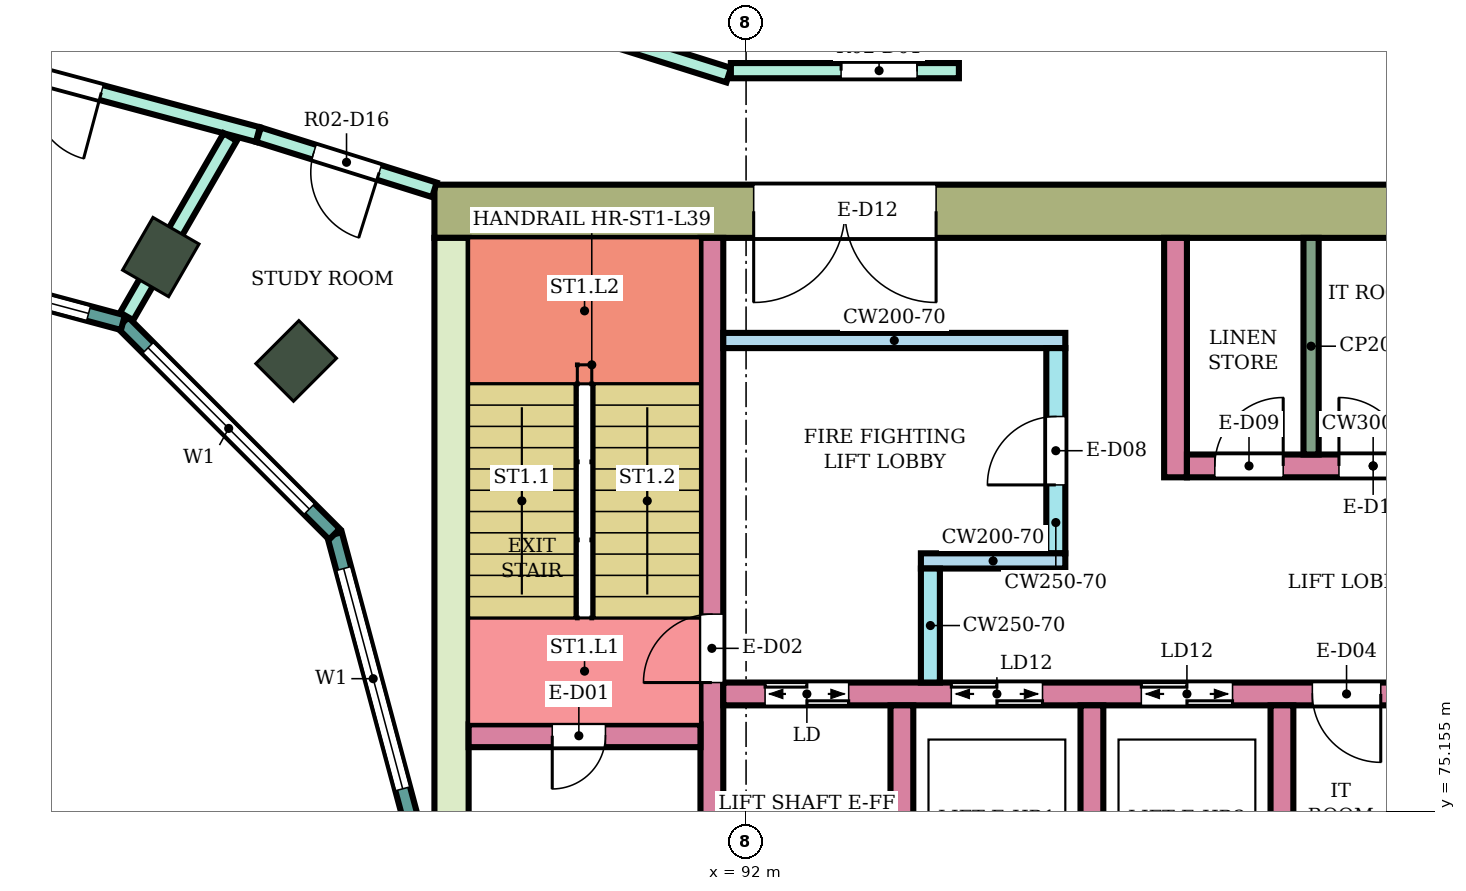
"""IFC4 building model, lengths in metres.
Left out: names, types, materials, properties, quantities, classifications, styles, units other than length and angle.
Written with IfcOpenShell. Run it as: python <this file> out.ifc"""

import sys

from ifc_helpers import new_model, si_unit, direction, frame, frame_2d, origin, origin_2d, place, context, subcontext, project, spatial, rectangle, extrude, element, fill, save


model = new_model("IFC4")
c1 = context("Model", 3, precision=1e-05, world=origin(), true_north=direction((0.0, 1.0)))
c2 = subcontext(c1, "Body", "Model", "MODEL_VIEW")
j1 = project(units=[si_unit("LENGTHUNIT", "METRE"), si_unit("PLANEANGLEUNIT", "RADIAN")], contexts=[c1])
p1 = place(None, origin())
s1 = spatial("IfcSite", under=j1, at=p1, CompositionType="ELEMENT")
p2 = place(p1, origin())
s2 = spatial("IfcBuilding", under=s1, at=p2, CompositionType="ELEMENT")
p3 = place(p2, frame((0.0, 0.0, 170.0)))
s3 = spatial("IfcBuildingStorey", under=s2, at=p3, CompositionType="ELEMENT", Elevation=170.0)
for number, where, z_axis, x_axis in (
    (1, (86.081, 81.081, 0.0), (0.0, 0.0, 1.0), (0.707, 0.707, 0.0)),
    (2, (84.3, 82.448, 0.0), (0.0, 0.0, 1.0), (0.5, 0.866, 0.0)),
):
    element("IfcColumn", number, at=place(p3, frame(where, z_axis=z_axis, x_axis=x_axis)), inside=s3, PredefinedType="COLUMN", context=c2, shape_type="SweptSolid", body=[
        extrude(rectangle(XDim=0.8, YDim=0.7, at=origin_2d()), origin(), (0.0, 0.0, 1.0), 4.1),
    ])
p4 = place(p3, frame((87.9, 83.05, 0.0), z_axis=(0.0, 0.0, 1.0), x_axis=(1.0, 0.0, 0.0)))
e3 = element("IfcWall", 3, at=p4, inside=s3, PredefinedType="SHEAR", context=c2, shape_type="SweptSolid", body=[
    extrude(rectangle(XDim=14.8, YDim=0.7, at=frame_2d((7.4, 0.0))), origin(), (0.0, 0.0, 1.0), 3.78),
])
p5 = place(p4, frame((4.2, 0.0, 0.0)))
e4 = element("IfcOpeningElement", 4, at=p5, cuts=e3, PredefinedType="OPENING", context=c2, shape_type="SweptSolid", body=[
    extrude(rectangle(XDim=2.4, YDim=2.4, at=frame_2d((1.2, 1.2))), frame((0.0, 0.36, 0.0), z_axis=(0.0, -1.0, 0.0), x_axis=(1.0, 0.0, 0.0)), (0.0, 0.0, 1.0), 0.72),
])
p6 = place(p3, frame((88.125, 75.0, 0.0), z_axis=(0.0, 0.0, 1.0), x_axis=(0.0, 1.0, 0.0)))
e5 = element("IfcWall", 5, at=p6, inside=s3, PredefinedType="SHEAR", context=c2, shape_type="SweptSolid", body=[
    extrude(rectangle(XDim=7.7, YDim=0.45, at=frame_2d((3.85, 0.0))), origin(), (0.0, 0.0, 1.0), 3.78),
])
p7 = place(p3, frame((91.55, 75.0, 0.0), z_axis=(0.0, 0.0, 1.0), x_axis=(0.0, 1.0, 0.0)))
e6 = element("IfcWall", 6, at=p7, inside=s3, PredefinedType="SHEAR", context=c2, shape_type="SweptSolid", body=[
    extrude(rectangle(XDim=7.7, YDim=0.3, at=frame_2d((3.85, 0.0))), origin(), (0.0, 0.0, 1.0), 3.78),
])
p8 = place(p7, frame((1.85, 0.0, 0.0)))
e7 = element("IfcOpeningElement", 7, at=p8, cuts=e6, PredefinedType="OPENING", context=c2, shape_type="SweptSolid", body=[
    extrude(rectangle(XDim=0.9, YDim=2.1, at=frame_2d((0.45, 1.05))), frame((0.0, 0.16, 0.0), z_axis=(0.0, -1.0, 0.0), x_axis=(1.0, 0.0, 0.0)), (0.0, 0.0, 1.0), 0.32),
])
p9 = place(p3, frame((88.35, 76.15, 0.0), z_axis=(0.0, 0.0, 1.0), x_axis=(1.0, 0.0, 0.0)))
e8 = element("IfcWall", 8, at=p9, inside=s3, PredefinedType="SHEAR", context=c2, shape_type="SweptSolid", body=[
    extrude(rectangle(XDim=3.05, YDim=0.3, at=frame_2d((1.525, 0.0))), origin(), (0.0, 0.0, 1.0), 3.78),
])
p10 = place(p9, frame((1.1, 0.0, 0.0)))
e9 = element("IfcOpeningElement", 9, at=p10, cuts=e8, PredefinedType="OPENING", context=c2, shape_type="SweptSolid", body=[
    extrude(rectangle(XDim=0.7, YDim=2.0, at=frame_2d((0.35, 1.0))), frame((0.0, 0.16, 0.0), z_axis=(0.0, -1.0, 0.0), x_axis=(1.0, 0.0, 0.0)), (0.0, 0.0, 1.0), 0.32),
])
p11 = place(p3, frame((91.7, 76.7, 0.0), z_axis=(0.0, 0.0, 1.0), x_axis=(1.0, 0.0, 0.0)))
e10 = element("IfcWall", 10, at=p11, inside=s3, PredefinedType="SHEAR", context=c2, shape_type="SweptSolid", body=[
    extrude(rectangle(XDim=11.0, YDim=0.3, at=frame_2d((5.5, 0.0))), origin(), (0.0, 0.0, 1.0), 3.78),
])
p12 = place(p11, frame((0.55, 0.0, 0.0)))
e11 = element("IfcOpeningElement", 11, at=p12, cuts=e10, PredefinedType="OPENING", context=c2, shape_type="SweptSolid", body=[
    extrude(rectangle(XDim=1.1, YDim=2.1, at=frame_2d((0.55, 1.05))), frame((0.0, 0.16, 0.0), z_axis=(0.0, -1.0, 0.0), x_axis=(1.0, 0.0, 0.0)), (0.0, 0.0, 1.0), 0.32),
])
p13 = place(p11, frame((3.0, 0.0, 0.0)))
e12 = element("IfcOpeningElement", 12, at=p13, cuts=e10, PredefinedType="OPENING", context=c2, shape_type="SweptSolid", body=[
    extrude(rectangle(XDim=1.2, YDim=2.1, at=frame_2d((0.6, 1.05))), frame((0.0, 0.16, 0.0), z_axis=(0.0, -1.0, 0.0), x_axis=(1.0, 0.0, 0.0)), (0.0, 0.0, 1.0), 0.32),
])
p14 = place(p11, frame((5.5, 0.0, 0.0)))
e13 = element("IfcOpeningElement", 13, at=p14, cuts=e10, PredefinedType="OPENING", context=c2, shape_type="SweptSolid", body=[
    extrude(rectangle(XDim=1.2, YDim=2.1, at=frame_2d((0.6, 1.05))), frame((0.0, 0.16, 0.0), z_axis=(0.0, -1.0, 0.0), x_axis=(1.0, 0.0, 0.0)), (0.0, 0.0, 1.0), 0.32),
])
p15 = place(p11, frame((7.75, 0.0, 0.0)))
e14 = element("IfcOpeningElement", 14, at=p15, cuts=e10, PredefinedType="OPENING", context=c2, shape_type="SweptSolid", body=[
    extrude(rectangle(XDim=0.9, YDim=2.1, at=frame_2d((0.45, 1.05))), frame((0.0, 0.16, 0.0), z_axis=(0.0, -1.0, 0.0), x_axis=(1.0, 0.0, 0.0)), (0.0, 0.0, 1.0), 0.32),
])
p16 = place(p11, frame((9.5, 0.0, 0.0)))
e15 = element("IfcOpeningElement", 15, at=p16, cuts=e10, PredefinedType="OPENING", context=c2, shape_type="SweptSolid", body=[
    extrude(rectangle(XDim=0.9, YDim=2.1, at=frame_2d((0.45, 1.05))), frame((0.0, 0.16, 0.0), z_axis=(0.0, -1.0, 0.0), x_axis=(1.0, 0.0, 0.0)), (0.0, 0.0, 1.0), 0.32),
])
for number, where, z_axis, x_axis in (
    (16, (94.05, 74.0, 0.0), (0.0, 0.0, 1.0), (0.0, 1.0, 0.0)),
    (17, (96.55, 74.0, 0.0), (0.0, 0.0, 1.0), (0.0, 1.0, 0.0)),
    (18, (99.05, 74.0, 0.0), (0.0, 0.0, 1.0), (0.0, 1.0, 0.0)),
):
    element("IfcWall", number, at=place(p3, frame(where, z_axis=z_axis, x_axis=x_axis)), inside=s3, PredefinedType="SHEAR", context=c2, shape_type="SweptSolid", body=[
        extrude(rectangle(XDim=2.55, YDim=0.3, at=frame_2d((1.275, 0.0))), origin(), (0.0, 0.0, 1.0), 3.78),
    ])
p17 = place(p3, frame((91.7, 81.35, 0.0), z_axis=(0.0, 0.0, 1.0), x_axis=(1.0, 0.0, 0.0)))
e19 = element("IfcWall", 19, at=p17, inside=s3, PredefinedType="SHEAR", context=c2, shape_type="SweptSolid", body=[
    extrude(rectangle(XDim=4.5, YDim=0.2, at=frame_2d((2.25, 0.0))), origin(), (0.0, 0.0, 1.0), 3.78),
])
p18 = place(p3, frame((96.075, 78.55, 0.0), z_axis=(0.0, 0.0, 1.0), x_axis=(0.0, 1.0, 0.0)))
e20 = element("IfcWall", 20, at=p18, inside=s3, PredefinedType="SHEAR", context=c2, shape_type="SweptSolid", body=[
    extrude(rectangle(XDim=2.7, YDim=0.25, at=frame_2d((1.35, 0.0))), origin(), (0.0, 0.0, 1.0), 3.78),
])
p19 = place(p18, frame((0.9, 0.0, 0.0)))
e21 = element("IfcOpeningElement", 21, at=p19, cuts=e20, PredefinedType="OPENING", context=c2, shape_type="SweptSolid", body=[
    extrude(rectangle(XDim=0.9, YDim=2.1, at=frame_2d((0.45, 1.05))), frame((0.0, 0.135, 0.0), z_axis=(0.0, -1.0, 0.0), x_axis=(1.0, 0.0, 0.0)), (0.0, 0.0, 1.0), 0.27),
])
p20 = place(p3, frame((94.3, 78.45, 0.0), z_axis=(0.0, 0.0, 1.0), x_axis=(1.0, 0.0, 0.0)))
e22 = element("IfcWall", 22, at=p20, inside=s3, PredefinedType="SHEAR", context=c2, shape_type="SweptSolid", body=[
    extrude(rectangle(XDim=1.9, YDim=0.2, at=frame_2d((0.95, 0.0))), origin(), (0.0, 0.0, 1.0), 3.78),
])
p21 = place(p3, frame((94.425, 76.85, 0.0), z_axis=(0.0, 0.0, 1.0), x_axis=(0.0, 1.0, 0.0)))
e23 = element("IfcWall", 23, at=p21, inside=s3, PredefinedType="SHEAR", context=c2, shape_type="SweptSolid", body=[
    extrude(rectangle(XDim=1.5, YDim=0.25, at=frame_2d((0.75, 0.0))), origin(), (0.0, 0.0, 1.0), 3.78),
])
p22 = place(p3, frame((97.65, 79.55, 0.0), z_axis=(0.0, 0.0, 1.0), x_axis=(0.0, 1.0, 0.0)))
e24 = element("IfcWall", 24, at=p22, inside=s3, PredefinedType="SHEAR", context=c2, shape_type="SweptSolid", body=[
    extrude(rectangle(XDim=3.15, YDim=0.3, at=frame_2d((1.575, 0.0))), origin(), (0.0, 0.0, 1.0), 3.78),
])
p23 = place(p3, frame((97.8, 79.7, 0.0), z_axis=(0.0, 0.0, 1.0), x_axis=(1.0, 0.0, 0.0)))
e25 = element("IfcWall", 25, at=p23, inside=s3, PredefinedType="SHEAR", context=c2, shape_type="SweptSolid", body=[
    extrude(rectangle(XDim=4.9, YDim=0.3, at=frame_2d((2.45, 0.0))), origin(), (0.0, 0.0, 1.0), 3.78),
])
p24 = place(p23, frame((0.367, 0.0, 0.0)))
e26 = element("IfcOpeningElement", 26, at=p24, cuts=e25, PredefinedType="OPENING", context=c2, shape_type="SweptSolid", body=[
    extrude(rectangle(XDim=0.9, YDim=2.1, at=frame_2d((0.45, 1.05))), frame((0.0, 0.16, 0.0), z_axis=(0.0, -1.0, 0.0), x_axis=(1.0, 0.0, 0.0)), (0.0, 0.0, 1.0), 0.32),
])
p25 = place(p23, frame((2.0, 0.0, 0.0)))
e27 = element("IfcOpeningElement", 27, at=p25, cuts=e25, PredefinedType="OPENING", context=c2, shape_type="SweptSolid", body=[
    extrude(rectangle(XDim=0.9, YDim=2.1, at=frame_2d((0.45, 1.05))), frame((0.0, 0.16, 0.0), z_axis=(0.0, -1.0, 0.0), x_axis=(1.0, 0.0, 0.0)), (0.0, 0.0, 1.0), 0.32),
])
p26 = place(p23, frame((3.633, 0.0, 0.0)))
e28 = element("IfcOpeningElement", 28, at=p26, cuts=e25, PredefinedType="OPENING", context=c2, shape_type="SweptSolid", body=[
    extrude(rectangle(XDim=0.9, YDim=2.1, at=frame_2d((0.45, 1.05))), frame((0.0, 0.16, 0.0), z_axis=(0.0, -1.0, 0.0), x_axis=(1.0, 0.0, 0.0)), (0.0, 0.0, 1.0), 0.32),
])
p27 = place(p3, frame((87.604, 75.0, 0.0), z_axis=(0.0, 0.0, 1.0), x_axis=(-0.258789828301, 0.965933654434, 0.0)))
e29 = element("IfcWall", 29, at=p27, inside=s3, PredefinedType="NOTDEFINED", context=c2, shape_type="SweptSolid", body=[
    extrude(rectangle(XDim=3.936, YDim=0.2, at=frame_2d((1.968, 0.0))), origin(), (0.0, 0.0, 1.0), 4.1),
])
p28 = place(p27, frame((0.468, 0.0, 0.9)))
e30 = element("IfcOpeningElement", 30, at=p28, cuts=e29, PredefinedType="OPENING", context=c2, shape_type="SweptSolid", body=[
    extrude(rectangle(XDim=3.0, YDim=2.3, at=frame_2d((1.5, 1.15))), frame((0.0, 0.11, 0.0), z_axis=(0.0, -1.0, 0.0), x_axis=(1.0, 0.0, 0.0)), (0.0, 0.0, 1.0), 0.22),
])
p29 = place(p3, frame((86.585, 78.802, 0.0), z_axis=(0.0, 0.0, 1.0), x_axis=(-0.707106781187, 0.707106781187, 0.0)))
e31 = element("IfcWall", 31, at=p29, inside=s3, PredefinedType="NOTDEFINED", context=c2, shape_type="SweptSolid", body=[
    extrude(rectangle(XDim=3.936, YDim=0.2, at=frame_2d((1.968, 0.0))), origin(), (0.0, 0.0, 1.0), 4.1),
])
p30 = place(p29, frame((0.468, 0.0, 0.9)))
e32 = element("IfcOpeningElement", 32, at=p30, cuts=e31, PredefinedType="OPENING", context=c2, shape_type="SweptSolid", body=[
    extrude(rectangle(XDim=3.0, YDim=2.3, at=frame_2d((1.5, 1.15))), frame((0.0, 0.11, 0.0), z_axis=(0.0, -1.0, 0.0), x_axis=(1.0, 0.0, 0.0)), (0.0, 0.0, 1.0), 0.22),
])
p31 = place(p3, frame((83.802, 81.585, 0.0), z_axis=(0.0, 0.0, 1.0), x_axis=(-0.965933654434, 0.258789828301, 0.0)))
e33 = element("IfcWall", 33, at=p31, inside=s3, PredefinedType="NOTDEFINED", context=c2, shape_type="SweptSolid", body=[
    extrude(rectangle(XDim=3.936, YDim=0.2, at=frame_2d((1.968, 0.0))), origin(), (0.0, 0.0, 1.0), 4.1),
])
p32 = place(p31, frame((0.468, 0.0, 0.9)))
e34 = element("IfcOpeningElement", 34, at=p32, cuts=e33, PredefinedType="OPENING", context=c2, shape_type="SweptSolid", body=[
    extrude(rectangle(XDim=3.0, YDim=2.3, at=frame_2d((1.5, 1.15))), frame((0.0, 0.11, 0.0), z_axis=(0.0, -1.0, 0.0), x_axis=(1.0, 0.0, 0.0)), (0.0, 0.0, 1.0), 0.22),
])
p33 = place(p3, frame((80.0, 85.554, 0.0), z_axis=(0.0, 0.0, 1.0), x_axis=(0.965894438951, -0.258936155845, 0.0)))
e35 = element("IfcWall", 35, at=p33, inside=s3, PredefinedType="PARTITIONING", context=c2, shape_type="SweptSolid", body=[
    extrude(rectangle(XDim=5.774, YDim=0.2, at=frame_2d((2.887, 0.0))), origin(), (0.0, 0.0, 1.0), 3.65),
])
p34 = place(p33, frame((1.841, 0.0, 0.0)))
e36 = element("IfcOpeningElement", 36, at=p34, cuts=e35, PredefinedType="OPENING", context=c2, shape_type="SweptSolid", body=[
    extrude(rectangle(XDim=1.8, YDim=2.1, at=frame_2d((0.9, 1.05))), frame((0.0, 0.11, 0.0), z_axis=(0.0, -1.0, 0.0), x_axis=(1.0, 0.0, 0.0)), (0.0, 0.0, 1.0), 0.22),
])
p35 = place(p3, frame((83.851, 81.667, 0.0), z_axis=(0.0, 0.0, 1.0), x_axis=(0.500099931433, 0.865967700657, 0.0)))
e37 = element("IfcWall", 37, at=p35, inside=s3, PredefinedType="PARTITIONING", context=c2, shape_type="SweptSolid", body=[
    extrude(rectangle(XDim=2.725, YDim=0.2, at=frame_2d((1.362, 0.0))), origin(), (0.0, 0.0, 1.0), 3.65),
])
p36 = place(p3, frame((85.587, 84.057, 0.0), z_axis=(0.0, 0.0, 1.0), x_axis=(0.954239513179, -0.299043393987, 0.0)))
e38 = element("IfcWall", 38, at=p36, inside=s3, PredefinedType="PARTITIONING", context=c2, shape_type="SweptSolid", body=[
    extrude(rectangle(XDim=2.424, YDim=0.2, at=frame_2d((1.212, 0.0))), origin(), (0.0, 0.0, 1.0), 3.65),
])
p37 = place(p36, frame((0.762, 0.0, 0.0)))
e39 = element("IfcOpeningElement", 39, at=p37, cuts=e38, PredefinedType="OPENING", context=c2, shape_type="SweptSolid", body=[
    extrude(rectangle(XDim=0.9, YDim=2.1, at=frame_2d((0.45, 1.05))), frame((0.0, 0.11, 0.0), z_axis=(0.0, -1.0, 0.0), x_axis=(1.0, 0.0, 0.0)), (0.0, 0.0, 1.0), 0.22),
])
p38 = place(p3, frame((86.313, 86.554, 0.0), z_axis=(0.0, 0.0, 1.0), x_axis=(0.954081217458, -0.299548043717, 0.0)))
e40 = element("IfcWall", 40, at=p38, inside=s3, PredefinedType="PARTITIONING", context=c2, shape_type="SweptSolid", body=[
    extrude(rectangle(XDim=5.721, YDim=0.2, at=frame_2d((2.86, 0.0))), origin(), (0.0, 0.0, 1.0), 3.65),
])
p39 = place(p3, frame((91.8, 84.9, 0.0), z_axis=(0.0, 0.0, 1.0), x_axis=(1.0, 0.0, 0.0)))
e41 = element("IfcWall", 41, at=p39, inside=s3, PredefinedType="PARTITIONING", context=c2, shape_type="SweptSolid", body=[
    extrude(rectangle(XDim=3.0, YDim=0.2, at=frame_2d((1.5, 0.0))), origin(), (0.0, 0.0, 1.0), 3.65),
])
p40 = place(p39, frame((1.45, 0.0, 0.0)))
e42 = element("IfcOpeningElement", 42, at=p40, cuts=e41, PredefinedType="OPENING", context=c2, shape_type="SweptSolid", body=[
    extrude(rectangle(XDim=1.0, YDim=2.1, at=frame_2d((0.5, 1.05))), frame((0.0, 0.11, 0.0), z_axis=(0.0, -1.0, 0.0), x_axis=(1.0, 0.0, 0.0)), (0.0, 0.0, 1.0), 0.22),
])
p41 = place(p3, frame((99.433, 79.85, 0.0), z_axis=(0.0, 0.0, 1.0), x_axis=(0.0, 1.0, 0.0)))
e43 = element("IfcWall", 43, at=p41, inside=s3, PredefinedType="PARTITIONING", context=c2, shape_type="SweptSolid", body=[
    extrude(rectangle(XDim=2.85, YDim=0.2, at=frame_2d((1.425, 0.0))), origin(), (0.0, 0.0, 1.0), 3.78),
])
p42 = place(p28, origin())
e44 = element("IfcWindow", 44, at=p42, inside=s3, PartitioningType="SINGLE_PANEL", PredefinedType="WINDOW", context=c2, shape_type="SweptSolid", body=[
    extrude(rectangle(XDim=3.0, YDim=2.3, at=frame_2d((1.5, 1.15))), frame((0.0, 0.03, 0.0), z_axis=(0.0, -1.0, 0.0), x_axis=(1.0, 0.0, 0.0)), (0.0, 0.0, 1.0), 0.06),
])
fill(e30, e44)
p43 = place(p30, origin())
e45 = element("IfcWindow", 45, at=p43, inside=s3, PartitioningType="SINGLE_PANEL", PredefinedType="WINDOW", context=c2, shape_type="SweptSolid", body=[
    extrude(rectangle(XDim=3.0, YDim=2.3, at=frame_2d((1.5, 1.15))), frame((0.0, 0.03, 0.0), z_axis=(0.0, -1.0, 0.0), x_axis=(1.0, 0.0, 0.0)), (0.0, 0.0, 1.0), 0.06),
])
fill(e32, e45)
p44 = place(p32, origin())
e46 = element("IfcWindow", 46, at=p44, inside=s3, PartitioningType="SINGLE_PANEL", PredefinedType="WINDOW", context=c2, shape_type="SweptSolid", body=[
    extrude(rectangle(XDim=3.0, YDim=2.3, at=frame_2d((1.5, 1.15))), frame((0.0, 0.03, 0.0), z_axis=(0.0, -1.0, 0.0), x_axis=(1.0, 0.0, 0.0)), (0.0, 0.0, 1.0), 0.06),
])
fill(e34, e46)
p45 = place(p40, origin())
e47 = element("IfcDoor", 47, at=p45, inside=s3, OperationType="SINGLE_SWING_LEFT", PredefinedType="DOOR", context=c2, shape_type="SweptSolid", body=[
    extrude(rectangle(XDim=1.0, YDim=2.1, at=frame_2d((0.5, 1.05))), frame((0.0, 0.025, 0.0), z_axis=(0.0, -1.0, 0.0), x_axis=(1.0, 0.0, 0.0)), (0.0, 0.0, 1.0), 0.05),
])
fill(e42, e47)
p46 = place(p37, frame((0.9, 0.0, 0.0), z_axis=(0.0, 0.0, 1.0), x_axis=(-1.0, 0.0, 0.0)))
e48 = element("IfcDoor", 48, at=p46, inside=s3, OperationType="SINGLE_SWING_LEFT", PredefinedType="DOOR", context=c2, shape_type="SweptSolid", body=[
    extrude(rectangle(XDim=0.9, YDim=2.1, at=frame_2d((0.45, 1.05))), frame((0.0, 0.025, 0.0), z_axis=(0.0, -1.0, 0.0), x_axis=(1.0, 0.0, 0.0)), (0.0, 0.0, 1.0), 0.05),
])
fill(e39, e48)
p47 = place(p34, frame((1.8, 0.0, 0.0), z_axis=(0.0, 0.0, 1.0), x_axis=(-1.0, 0.0, 0.0)))
e49 = element("IfcDoor", 49, at=p47, inside=s3, OperationType="DOUBLE_DOOR_SINGLE_SWING", PredefinedType="DOOR", context=c2, shape_type="SweptSolid", body=[
    extrude(rectangle(XDim=1.8, YDim=2.1, at=frame_2d((0.9, 1.05))), frame((0.0, 0.025, 0.0), z_axis=(0.0, -1.0, 0.0), x_axis=(1.0, 0.0, 0.0)), (0.0, 0.0, 1.0), 0.05),
])
fill(e36, e49)
p48 = place(p10, frame((0.7, 0.0, 0.0), z_axis=(0.0, 0.0, 1.0), x_axis=(-1.0, 0.0, 0.0)))
e50 = element("IfcDoor", 50, at=p48, inside=s3, OperationType="SINGLE_SWING_RIGHT", PredefinedType="DOOR", context=c2, shape_type="SweptSolid", body=[
    extrude(rectangle(XDim=0.7, YDim=2.0, at=frame_2d((0.35, 1.0))), frame((0.0, 0.025, 0.0), z_axis=(0.0, -1.0, 0.0), x_axis=(1.0, 0.0, 0.0)), (0.0, 0.0, 1.0), 0.05),
])
fill(e9, e50)
p49 = place(p8, origin())
e51 = element("IfcDoor", 51, at=p49, inside=s3, OperationType="SINGLE_SWING_LEFT", PredefinedType="DOOR", context=c2, shape_type="SweptSolid", body=[
    extrude(rectangle(XDim=0.9, YDim=2.1, at=frame_2d((0.45, 1.05))), frame((0.0, 0.025, 0.0), z_axis=(0.0, -1.0, 0.0), x_axis=(1.0, 0.0, 0.0)), (0.0, 0.0, 1.0), 0.05),
])
fill(e7, e51)
p50 = place(p12, origin())
e52 = element("IfcDoor", 52, at=p50, inside=s3, OperationType="DOUBLE_DOOR_SLIDING", PredefinedType="DOOR", context=c2, shape_type="SweptSolid", body=[
    extrude(rectangle(XDim=1.1, YDim=2.1, at=frame_2d((0.55, 1.05))), frame((0.0, 0.025, 0.0), z_axis=(0.0, -1.0, 0.0), x_axis=(1.0, 0.0, 0.0)), (0.0, 0.0, 1.0), 0.05),
])
fill(e11, e52)
p51 = place(p13, origin())
e53 = element("IfcDoor", 53, at=p51, inside=s3, OperationType="DOUBLE_DOOR_SLIDING", PredefinedType="DOOR", context=c2, shape_type="SweptSolid", body=[
    extrude(rectangle(XDim=1.2, YDim=2.1, at=frame_2d((0.6, 1.05))), frame((0.0, 0.025, 0.0), z_axis=(0.0, -1.0, 0.0), x_axis=(1.0, 0.0, 0.0)), (0.0, 0.0, 1.0), 0.05),
])
fill(e12, e53)
p52 = place(p14, origin())
e54 = element("IfcDoor", 54, at=p52, inside=s3, OperationType="DOUBLE_DOOR_SLIDING", PredefinedType="DOOR", context=c2, shape_type="SweptSolid", body=[
    extrude(rectangle(XDim=1.2, YDim=2.1, at=frame_2d((0.6, 1.05))), frame((0.0, 0.025, 0.0), z_axis=(0.0, -1.0, 0.0), x_axis=(1.0, 0.0, 0.0)), (0.0, 0.0, 1.0), 0.05),
])
fill(e13, e54)
p53 = place(p15, frame((0.9, 0.0, 0.0), z_axis=(0.0, 0.0, 1.0), x_axis=(-1.0, 0.0, 0.0)))
e55 = element("IfcDoor", 55, at=p53, inside=s3, OperationType="SINGLE_SWING_LEFT", PredefinedType="DOOR", context=c2, shape_type="SweptSolid", body=[
    extrude(rectangle(XDim=0.9, YDim=2.1, at=frame_2d((0.45, 1.05))), frame((0.0, 0.025, 0.0), z_axis=(0.0, -1.0, 0.0), x_axis=(1.0, 0.0, 0.0)), (0.0, 0.0, 1.0), 0.05),
])
fill(e14, e55)
p54 = place(p19, origin())
e56 = element("IfcDoor", 56, at=p54, inside=s3, OperationType="SINGLE_SWING_LEFT", PredefinedType="DOOR", context=c2, shape_type="SweptSolid", body=[
    extrude(rectangle(XDim=0.9, YDim=2.1, at=frame_2d((0.45, 1.05))), frame((0.0, 0.025, 0.0), z_axis=(0.0, -1.0, 0.0), x_axis=(1.0, 0.0, 0.0)), (0.0, 0.0, 1.0), 0.05),
])
fill(e21, e56)
p55 = place(p24, origin())
e57 = element("IfcDoor", 57, at=p55, inside=s3, OperationType="SINGLE_SWING_RIGHT", PredefinedType="DOOR", context=c2, shape_type="SweptSolid", body=[
    extrude(rectangle(XDim=0.9, YDim=2.1, at=frame_2d((0.45, 1.05))), frame((0.0, 0.025, 0.0), z_axis=(0.0, -1.0, 0.0), x_axis=(1.0, 0.0, 0.0)), (0.0, 0.0, 1.0), 0.05),
])
fill(e26, e57)
p56 = place(p25, origin())
e58 = element("IfcDoor", 58, at=p56, inside=s3, OperationType="SINGLE_SWING_LEFT", PredefinedType="DOOR", context=c2, shape_type="SweptSolid", body=[
    extrude(rectangle(XDim=0.9, YDim=2.1, at=frame_2d((0.45, 1.05))), frame((0.0, 0.025, 0.0), z_axis=(0.0, -1.0, 0.0), x_axis=(1.0, 0.0, 0.0)), (0.0, 0.0, 1.0), 0.05),
])
fill(e27, e58)
p57 = place(p5, frame((2.4, 0.0, 0.0), z_axis=(0.0, 0.0, 1.0), x_axis=(-1.0, 0.0, 0.0)))
e59 = element("IfcDoor", 59, at=p57, inside=s3, OperationType="DOUBLE_DOOR_SINGLE_SWING", PredefinedType="DOOR", context=c2, shape_type="SweptSolid", body=[
    extrude(rectangle(XDim=2.4, YDim=2.4, at=frame_2d((1.2, 1.2))), frame((0.0, 0.025, 0.0), z_axis=(0.0, -1.0, 0.0), x_axis=(1.0, 0.0, 0.0)), (0.0, 0.0, 1.0), 0.05),
])
fill(e4, e59)
save(model, sys.argv[1])
